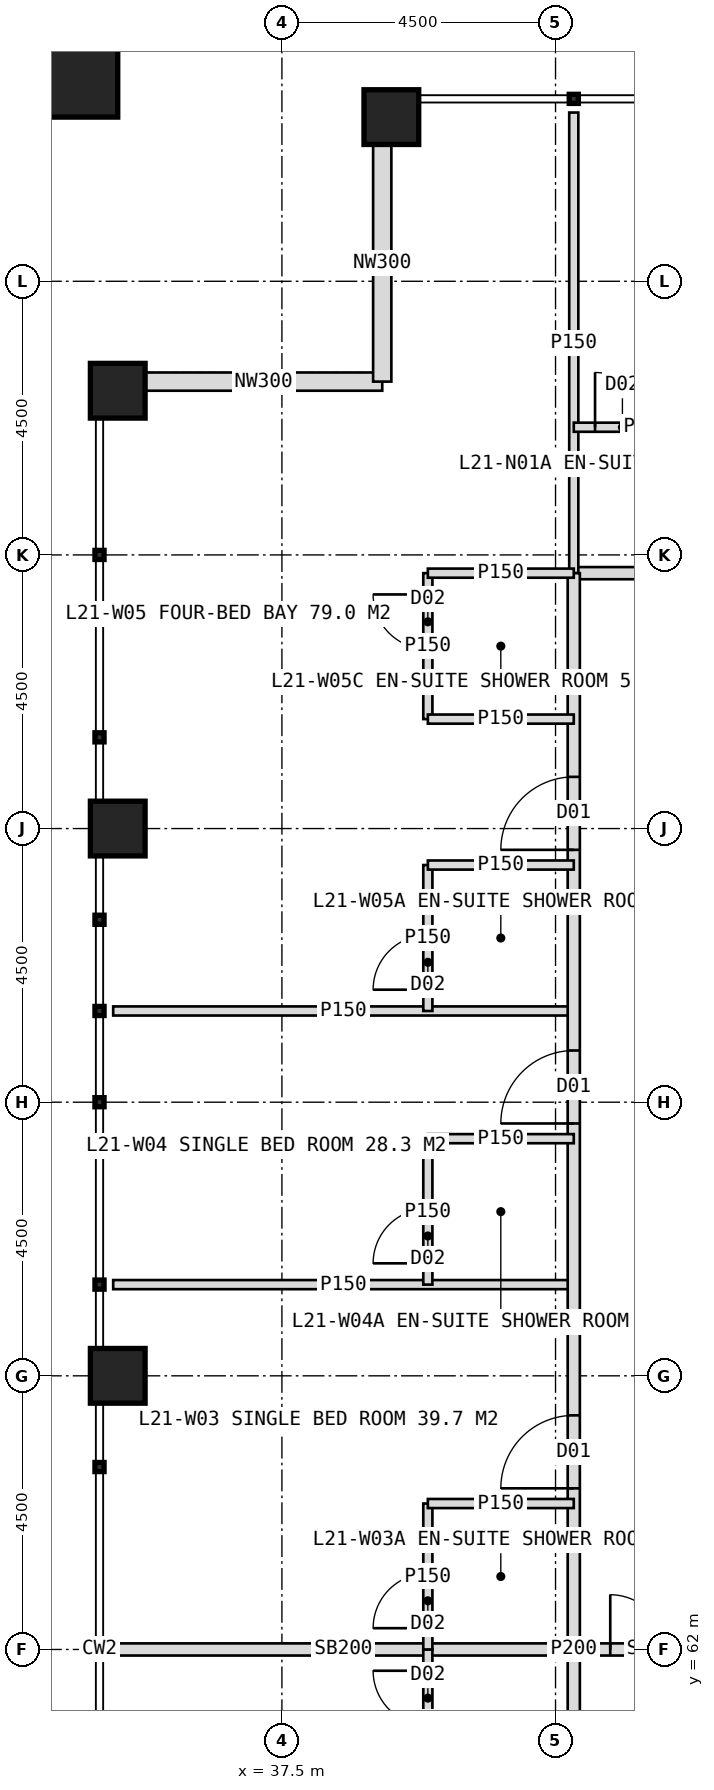
"""IFC4 building model, lengths in metres.
Left out: names, types, materials, properties, quantities, classifications, styles, units other than length and angle.
Written with IfcOpenShell. Run it as: python <this file> out.ifc"""

import sys

from ifc_helpers import new_model, si_unit, direction, frame, frame_2d, origin, origin_2d, place, context, subcontext, project, spatial, rectangle, hollow_rectangle, extrude, element, fill, save


model = new_model("IFC4")
c1 = context("Model", 3, precision=1e-05, world=origin(), true_north=direction((0.0, 1.0)))
c2 = subcontext(c1, "Body", "Model", "MODEL_VIEW")
j1 = project(units=[si_unit("LENGTHUNIT", "METRE"), si_unit("PLANEANGLEUNIT", "RADIAN")], contexts=[c1])
p1 = place(None, origin())
s1 = spatial("IfcSite", under=j1, at=p1, CompositionType="ELEMENT")
p2 = place(p1, origin())
s2 = spatial("IfcBuilding", under=s1, at=p2, CompositionType="ELEMENT")
p3 = place(p2, frame((0.0, 0.0, 91.0)))
s3 = spatial("IfcBuildingStorey", under=s2, at=p3, CompositionType="ELEMENT", Elevation=91.0)
for number, where, z_axis, x_axis in (
    (1, (39.3, 87.2, 0.0), (0.0, 0.0, 1.0), (1.0, 0.0, 0.0)),
    (2, (34.8, 66.5, 0.0), (0.0, 0.0, 1.0), (1.0, 0.0, 0.0)),
    (3, (34.8, 75.5, 0.0), (0.0, 0.0, 1.0), (1.0, 0.0, 0.0)),
    (4, (34.8, 82.7, 0.0), (0.0, 0.0, 1.0), (1.0, 0.0, 0.0)),
):
    element("IfcColumn", number, at=place(p3, frame(where, z_axis=z_axis, x_axis=x_axis)), inside=s3, PredefinedType="COLUMN", context=c2, shape_type="SweptSolid", body=[
        extrude(hollow_rectangle(XDim=0.9, YDim=0.9, WallThickness=0.08, at=origin_2d()), origin(), (0.0, 0.0, 1.0), 4.0),
    ])
p4 = place(p3, frame((33.9, 88.1, 0.0), z_axis=(0.0, 0.0, 1.0), x_axis=(1.0, 0.0, 0.0)))
e5 = element("IfcColumn", 5, at=p4, inside=s3, PredefinedType="COLUMN", context=c2, shape_type="SweptSolid", body=[
    extrude(hollow_rectangle(XDim=1.8, YDim=1.8, WallThickness=0.1, at=origin_2d()), origin(), (0.0, 0.0, 1.0), 2.0),
])
for number, where, z_axis, x_axis in (
    (6, (35.25, 82.85, 0.0), (0.0, 0.0, 1.0), (1.0, 0.0, 0.0)),
    (7, (39.15, 82.85, 0.0), (0.0, 0.0, 1.0), (0.0, 1.0, 0.0)),
):
    element("IfcWall", number, at=place(p3, frame(where, z_axis=z_axis, x_axis=x_axis)), inside=s3, PredefinedType="ELEMENTEDWALL", context=c2, shape_type="SweptSolid", body=[
        extrude(rectangle(XDim=3.9, YDim=0.3, at=frame_2d((1.95, 0.0))), origin(), (0.0, 0.0, 1.0), 2.95),
    ])
p5 = place(p3, frame((42.3, 79.7, 0.0), z_axis=(0.0, 0.0, 1.0), x_axis=(1.0, 0.0, 0.0)))
e8 = element("IfcWall", 8, at=p5, inside=s3, PredefinedType="PARTITIONING", context=c2, shape_type="SweptSolid", body=[
    extrude(rectangle(XDim=35.4, YDim=0.2, at=frame_2d((17.7, 0.0))), origin(), (0.0, 0.0, 1.0), 3.75),
])
p6 = place(p5, frame((2.65, 0.0, 0.0)))
e9 = element("IfcOpeningElement", 9, at=p6, cuts=e8, PredefinedType="OPENING", context=c2, shape_type="SweptSolid", body=[
    extrude(rectangle(XDim=1.2, YDim=2.2, at=frame_2d((0.6, 1.1))), frame((0.0, 0.11, 0.0), z_axis=(0.0, -1.0, 0.0), x_axis=(1.0, 0.0, 0.0)), (0.0, 0.0, 1.0), 0.22),
])
p7 = place(p5, frame((11.2, 0.0, 0.0)))
e10 = element("IfcOpeningElement", 10, at=p7, cuts=e8, PredefinedType="OPENING", context=c2, shape_type="SweptSolid", body=[
    extrude(rectangle(XDim=1.0, YDim=2.1, at=frame_2d((0.5, 1.05))), frame((0.0, 0.11, 0.0), z_axis=(0.0, -1.0, 0.0), x_axis=(1.0, 0.0, 0.0)), (0.0, 0.0, 1.0), 0.22),
])
p8 = place(p5, frame((17.2, 0.0, 0.0)))
e11 = element("IfcOpeningElement", 11, at=p8, cuts=e8, PredefinedType="OPENING", context=c2, shape_type="SweptSolid", body=[
    extrude(rectangle(XDim=1.0, YDim=2.1, at=frame_2d((0.5, 1.05))), frame((0.0, 0.11, 0.0), z_axis=(0.0, -1.0, 0.0), x_axis=(1.0, 0.0, 0.0)), (0.0, 0.0, 1.0), 0.22),
])
p9 = place(p5, frame((23.35, 0.0, 0.0)))
e12 = element("IfcOpeningElement", 12, at=p9, cuts=e8, PredefinedType="OPENING", context=c2, shape_type="SweptSolid", body=[
    extrude(rectangle(XDim=1.2, YDim=2.2, at=frame_2d((0.6, 1.1))), frame((0.0, 0.11, 0.0), z_axis=(0.0, -1.0, 0.0), x_axis=(1.0, 0.0, 0.0)), (0.0, 0.0, 1.0), 0.22),
])
p10 = place(p5, frame((29.35, 0.0, 0.0)))
e13 = element("IfcOpeningElement", 13, at=p10, cuts=e8, PredefinedType="OPENING", context=c2, shape_type="SweptSolid", body=[
    extrude(rectangle(XDim=1.2, YDim=2.2, at=frame_2d((0.6, 1.1))), frame((0.0, 0.11, 0.0), z_axis=(0.0, -1.0, 0.0), x_axis=(1.0, 0.0, 0.0)), (0.0, 0.0, 1.0), 0.22),
])
p11 = place(p3, frame((42.3, 79.7, 0.0), z_axis=(0.0, 0.0, 1.0), x_axis=(0.0, 1.0, 0.0)))
e14 = element("IfcWall", 14, at=p11, inside=s3, PredefinedType="PARTITIONING", context=c2, shape_type="SweptSolid", body=[
    extrude(rectangle(XDim=7.575, YDim=0.15, at=frame_2d((3.788, 0.0))), origin(), (0.0, 0.0, 1.0), 3.75),
])
p12 = place(p3, frame((42.3, 82.1, 0.0), z_axis=(0.0, 0.0, 1.0), x_axis=(1.0, 0.0, 0.0)))
e15 = element("IfcWall", 15, at=p12, inside=s3, PredefinedType="PARTITIONING", context=c2, shape_type="SweptSolid", body=[
    extrude(rectangle(XDim=2.4, YDim=0.15, at=frame_2d((1.2, 0.0))), origin(), (0.0, 0.0, 1.0), 3.75),
])
p13 = place(p12, frame((0.35, 0.0, 0.0)))
e16 = element("IfcOpeningElement", 16, at=p13, cuts=e15, PredefinedType="OPENING", context=c2, shape_type="SweptSolid", body=[
    extrude(rectangle(XDim=0.9, YDim=2.1, at=frame_2d((0.45, 1.05))), frame((0.0, 0.085, 0.0), z_axis=(0.0, -1.0, 0.0), x_axis=(1.0, 0.0, 0.0)), (0.0, 0.0, 1.0), 0.17),
])
p14 = place(p3, frame((42.3, 62.0, 0.0), z_axis=(0.0, 0.0, 1.0), x_axis=(-1.0, 0.0, 0.0)))
e17 = element("IfcWall", 17, at=p14, inside=s3, PredefinedType="SOLIDWALL", context=c2, shape_type="SweptSolid", body=[
    extrude(rectangle(XDim=7.575, YDim=0.2, at=frame_2d((3.788, 0.0))), origin(), (0.0, 0.0, 1.0), 2.75),
])
for number, where, z_axis, x_axis in (
    (18, (42.3, 68.0, 0.0), (0.0, 0.0, 1.0), (-1.0, 0.0, 0.0)),
    (19, (42.3, 72.5, 0.0), (0.0, 0.0, 1.0), (-1.0, 0.0, 0.0)),
):
    element("IfcWall", number, at=place(p3, frame(where, z_axis=z_axis, x_axis=x_axis)), inside=s3, PredefinedType="PARTITIONING", context=c2, shape_type="SweptSolid", body=[
        extrude(rectangle(XDim=7.575, YDim=0.15, at=frame_2d((3.788, 0.0))), origin(), (0.0, 0.0, 1.0), 3.75),
    ])
p15 = place(p3, frame((42.3, 44.3, 0.0), z_axis=(0.0, 0.0, 1.0), x_axis=(0.0, 1.0, 0.0)))
e20 = element("IfcWall", 20, at=p15, inside=s3, PredefinedType="PARTITIONING", context=c2, shape_type="SweptSolid", body=[
    extrude(rectangle(XDim=35.4, YDim=0.2, at=frame_2d((17.7, 0.0))), origin(), (0.0, 0.0, 1.0), 3.75),
])
p16 = place(p15, frame((2.65, 0.0, 0.0)))
e21 = element("IfcOpeningElement", 21, at=p16, cuts=e20, PredefinedType="OPENING", context=c2, shape_type="SweptSolid", body=[
    extrude(rectangle(XDim=1.2, YDim=2.2, at=frame_2d((0.6, 1.1))), frame((0.0, 0.11, 0.0), z_axis=(0.0, -1.0, 0.0), x_axis=(1.0, 0.0, 0.0)), (0.0, 0.0, 1.0), 0.22),
])
p17 = place(p15, frame((11.35, 0.0, 0.0)))
e22 = element("IfcOpeningElement", 22, at=p17, cuts=e20, PredefinedType="OPENING", context=c2, shape_type="SweptSolid", body=[
    extrude(rectangle(XDim=1.2, YDim=2.2, at=frame_2d((0.6, 1.1))), frame((0.0, 0.11, 0.0), z_axis=(0.0, -1.0, 0.0), x_axis=(1.0, 0.0, 0.0)), (0.0, 0.0, 1.0), 0.22),
])
p18 = place(p15, frame((20.35, 0.0, 0.0)))
e23 = element("IfcOpeningElement", 23, at=p18, cuts=e20, PredefinedType="OPENING", context=c2, shape_type="SweptSolid", body=[
    extrude(rectangle(XDim=1.2, YDim=2.2, at=frame_2d((0.6, 1.1))), frame((0.0, 0.11, 0.0), z_axis=(0.0, -1.0, 0.0), x_axis=(1.0, 0.0, 0.0)), (0.0, 0.0, 1.0), 0.22),
])
p19 = place(p15, frame((26.35, 0.0, 0.0)))
e24 = element("IfcOpeningElement", 24, at=p19, cuts=e20, PredefinedType="OPENING", context=c2, shape_type="SweptSolid", body=[
    extrude(rectangle(XDim=1.2, YDim=2.2, at=frame_2d((0.6, 1.1))), frame((0.0, 0.11, 0.0), z_axis=(0.0, -1.0, 0.0), x_axis=(1.0, 0.0, 0.0)), (0.0, 0.0, 1.0), 0.22),
])
p20 = place(p15, frame((30.85, 0.0, 0.0)))
e25 = element("IfcOpeningElement", 25, at=p20, cuts=e20, PredefinedType="OPENING", context=c2, shape_type="SweptSolid", body=[
    extrude(rectangle(XDim=1.2, YDim=2.2, at=frame_2d((0.6, 1.1))), frame((0.0, 0.11, 0.0), z_axis=(0.0, -1.0, 0.0), x_axis=(1.0, 0.0, 0.0)), (0.0, 0.0, 1.0), 0.22),
])
p21 = place(p3, frame((39.9, 59.6, 0.0), z_axis=(0.0, 0.0, 1.0), x_axis=(0.0, 1.0, 0.0)))
e26 = element("IfcWall", 26, at=p21, inside=s3, PredefinedType="PARTITIONING", context=c2, shape_type="SweptSolid", body=[
    extrude(rectangle(XDim=2.4, YDim=0.15, at=frame_2d((1.2, 0.0))), origin(), (0.0, 0.0, 1.0), 3.75),
])
p22 = place(p21, frame((1.15, 0.0, 0.0)))
e27 = element("IfcOpeningElement", 27, at=p22, cuts=e26, PredefinedType="OPENING", context=c2, shape_type="SweptSolid", body=[
    extrude(rectangle(XDim=0.9, YDim=2.1, at=frame_2d((0.45, 1.05))), frame((0.0, 0.085, 0.0), z_axis=(0.0, -1.0, 0.0), x_axis=(1.0, 0.0, 0.0)), (0.0, 0.0, 1.0), 0.17),
])
p23 = place(p3, frame((39.9, 62.0, 0.0), z_axis=(0.0, 0.0, 1.0), x_axis=(0.0, 1.0, 0.0)))
e28 = element("IfcWall", 28, at=p23, inside=s3, PredefinedType="PARTITIONING", context=c2, shape_type="SweptSolid", body=[
    extrude(rectangle(XDim=2.4, YDim=0.15, at=frame_2d((1.2, 0.0))), origin(), (0.0, 0.0, 1.0), 3.75),
])
p24 = place(p23, frame((0.35, 0.0, 0.0)))
e29 = element("IfcOpeningElement", 29, at=p24, cuts=e28, PredefinedType="OPENING", context=c2, shape_type="SweptSolid", body=[
    extrude(rectangle(XDim=0.9, YDim=2.1, at=frame_2d((0.45, 1.05))), frame((0.0, 0.085, 0.0), z_axis=(0.0, -1.0, 0.0), x_axis=(1.0, 0.0, 0.0)), (0.0, 0.0, 1.0), 0.17),
])
p25 = place(p3, frame((42.3, 64.4, 0.0), z_axis=(0.0, 0.0, 1.0), x_axis=(-1.0, 0.0, 0.0)))
e30 = element("IfcWall", 30, at=p25, inside=s3, PredefinedType="PARTITIONING", context=c2, shape_type="SweptSolid", body=[
    extrude(rectangle(XDim=2.4, YDim=0.15, at=frame_2d((1.2, 0.0))), origin(), (0.0, 0.0, 1.0), 3.75),
])
p26 = place(p3, frame((39.9, 68.0, 0.0), z_axis=(0.0, 0.0, 1.0), x_axis=(0.0, 1.0, 0.0)))
e31 = element("IfcWall", 31, at=p26, inside=s3, PredefinedType="PARTITIONING", context=c2, shape_type="SweptSolid", body=[
    extrude(rectangle(XDim=2.4, YDim=0.15, at=frame_2d((1.2, 0.0))), origin(), (0.0, 0.0, 1.0), 3.75),
])
p27 = place(p26, frame((0.35, 0.0, 0.0)))
e32 = element("IfcOpeningElement", 32, at=p27, cuts=e31, PredefinedType="OPENING", context=c2, shape_type="SweptSolid", body=[
    extrude(rectangle(XDim=0.9, YDim=2.1, at=frame_2d((0.45, 1.05))), frame((0.0, 0.085, 0.0), z_axis=(0.0, -1.0, 0.0), x_axis=(1.0, 0.0, 0.0)), (0.0, 0.0, 1.0), 0.17),
])
p28 = place(p3, frame((42.3, 70.4, 0.0), z_axis=(0.0, 0.0, 1.0), x_axis=(-1.0, 0.0, 0.0)))
e33 = element("IfcWall", 33, at=p28, inside=s3, PredefinedType="PARTITIONING", context=c2, shape_type="SweptSolid", body=[
    extrude(rectangle(XDim=2.4, YDim=0.15, at=frame_2d((1.2, 0.0))), origin(), (0.0, 0.0, 1.0), 3.75),
])
p29 = place(p3, frame((39.9, 72.5, 0.0), z_axis=(0.0, 0.0, 1.0), x_axis=(0.0, 1.0, 0.0)))
e34 = element("IfcWall", 34, at=p29, inside=s3, PredefinedType="PARTITIONING", context=c2, shape_type="SweptSolid", body=[
    extrude(rectangle(XDim=2.4, YDim=0.15, at=frame_2d((1.2, 0.0))), origin(), (0.0, 0.0, 1.0), 3.75),
])
p30 = place(p29, frame((0.35, 0.0, 0.0)))
e35 = element("IfcOpeningElement", 35, at=p30, cuts=e34, PredefinedType="OPENING", context=c2, shape_type="SweptSolid", body=[
    extrude(rectangle(XDim=0.9, YDim=2.1, at=frame_2d((0.45, 1.05))), frame((0.0, 0.085, 0.0), z_axis=(0.0, -1.0, 0.0), x_axis=(1.0, 0.0, 0.0)), (0.0, 0.0, 1.0), 0.17),
])
p31 = place(p3, frame((42.3, 74.9, 0.0), z_axis=(0.0, 0.0, 1.0), x_axis=(-1.0, 0.0, 0.0)))
e36 = element("IfcWall", 36, at=p31, inside=s3, PredefinedType="PARTITIONING", context=c2, shape_type="SweptSolid", body=[
    extrude(rectangle(XDim=2.4, YDim=0.15, at=frame_2d((1.2, 0.0))), origin(), (0.0, 0.0, 1.0), 3.75),
])
p32 = place(p3, frame((39.9, 77.3, 0.0), z_axis=(0.0, 0.0, 1.0), x_axis=(0.0, 1.0, 0.0)))
e37 = element("IfcWall", 37, at=p32, inside=s3, PredefinedType="PARTITIONING", context=c2, shape_type="SweptSolid", body=[
    extrude(rectangle(XDim=2.4, YDim=0.15, at=frame_2d((1.2, 0.0))), origin(), (0.0, 0.0, 1.0), 3.75),
])
p33 = place(p32, frame((1.15, 0.0, 0.0)))
e38 = element("IfcOpeningElement", 38, at=p33, cuts=e37, PredefinedType="OPENING", context=c2, shape_type="SweptSolid", body=[
    extrude(rectangle(XDim=0.9, YDim=2.1, at=frame_2d((0.45, 1.05))), frame((0.0, 0.085, 0.0), z_axis=(0.0, -1.0, 0.0), x_axis=(1.0, 0.0, 0.0)), (0.0, 0.0, 1.0), 0.17),
])
for number, where, z_axis, x_axis in (
    (39, (42.3, 77.3, 0.0), (0.0, 0.0, 1.0), (-1.0, 0.0, 0.0)),
    (40, (42.3, 79.7, 0.0), (0.0, 0.0, 1.0), (-1.0, 0.0, 0.0)),
):
    element("IfcWall", number, at=place(p3, frame(where, z_axis=z_axis, x_axis=x_axis)), inside=s3, PredefinedType="PARTITIONING", context=c2, shape_type="SweptSolid", body=[
        extrude(rectangle(XDim=2.4, YDim=0.15, at=frame_2d((1.2, 0.0))), origin(), (0.0, 0.0, 1.0), 3.75),
    ])
p34 = place(p3, frame((45.0, 62.0, 0.0), z_axis=(0.0, 0.0, 1.0), x_axis=(-1.0, 0.0, 0.0)))
e41 = element("IfcWall", 41, at=p34, inside=s3, PredefinedType="SOLIDWALL", context=c2, shape_type="SweptSolid", body=[
    extrude(rectangle(XDim=2.7, YDim=0.2, at=frame_2d((1.35, 0.0))), origin(), (0.0, 0.0, 1.0), 2.75),
])
p35 = place(p34, frame((0.3, 0.0, 0.0)))
e42 = element("IfcOpeningElement", 42, at=p35, cuts=e41, PredefinedType="OPENING", context=c2, shape_type="SweptSolid", body=[
    extrude(rectangle(XDim=1.8, YDim=2.2, at=frame_2d((0.9, 1.1))), frame((0.0, 0.11, 0.0), z_axis=(0.0, -1.0, 0.0), x_axis=(1.0, 0.0, 0.0)), (0.0, 0.0, 1.0), 0.22),
])
p36 = place(p13, origin())
e43 = element("IfcDoor", 43, at=p36, inside=s3, OperationType="SINGLE_SWING_LEFT", PredefinedType="DOOR", context=c2, shape_type="SweptSolid", body=[
    extrude(rectangle(XDim=0.9, YDim=2.1, at=frame_2d((0.45, 1.05))), frame((0.0, 0.025, 0.0), z_axis=(0.0, -1.0, 0.0), x_axis=(1.0, 0.0, 0.0)), (0.0, 0.0, 1.0), 0.05),
])
fill(e16, e43)
p37 = place(p22, origin())
e44 = element("IfcDoor", 44, at=p37, inside=s3, OperationType="SINGLE_SWING_RIGHT", PredefinedType="DOOR", context=c2, shape_type="SweptSolid", body=[
    extrude(rectangle(XDim=0.9, YDim=2.1, at=frame_2d((0.45, 1.05))), frame((0.0, 0.025, 0.0), z_axis=(0.0, -1.0, 0.0), x_axis=(1.0, 0.0, 0.0)), (0.0, 0.0, 1.0), 0.05),
])
fill(e27, e44)
p38 = place(p18, origin())
e45 = element("IfcDoor", 45, at=p38, inside=s3, OperationType="SINGLE_SWING_LEFT", PredefinedType="DOOR", context=c2, shape_type="SweptSolid", body=[
    extrude(rectangle(XDim=1.2, YDim=2.2, at=frame_2d((0.6, 1.1))), frame((0.0, 0.025, 0.0), z_axis=(0.0, -1.0, 0.0), x_axis=(1.0, 0.0, 0.0)), (0.0, 0.0, 1.0), 0.05),
])
fill(e23, e45)
p39 = place(p24, origin())
e46 = element("IfcDoor", 46, at=p39, inside=s3, OperationType="SINGLE_SWING_LEFT", PredefinedType="DOOR", context=c2, shape_type="SweptSolid", body=[
    extrude(rectangle(XDim=0.9, YDim=2.1, at=frame_2d((0.45, 1.05))), frame((0.0, 0.025, 0.0), z_axis=(0.0, -1.0, 0.0), x_axis=(1.0, 0.0, 0.0)), (0.0, 0.0, 1.0), 0.05),
])
fill(e29, e46)
p40 = place(p19, origin())
e47 = element("IfcDoor", 47, at=p40, inside=s3, OperationType="SINGLE_SWING_LEFT", PredefinedType="DOOR", context=c2, shape_type="SweptSolid", body=[
    extrude(rectangle(XDim=1.2, YDim=2.2, at=frame_2d((0.6, 1.1))), frame((0.0, 0.025, 0.0), z_axis=(0.0, -1.0, 0.0), x_axis=(1.0, 0.0, 0.0)), (0.0, 0.0, 1.0), 0.05),
])
fill(e24, e47)
p41 = place(p27, origin())
e48 = element("IfcDoor", 48, at=p41, inside=s3, OperationType="SINGLE_SWING_LEFT", PredefinedType="DOOR", context=c2, shape_type="SweptSolid", body=[
    extrude(rectangle(XDim=0.9, YDim=2.1, at=frame_2d((0.45, 1.05))), frame((0.0, 0.025, 0.0), z_axis=(0.0, -1.0, 0.0), x_axis=(1.0, 0.0, 0.0)), (0.0, 0.0, 1.0), 0.05),
])
fill(e32, e48)
p42 = place(p20, origin())
e49 = element("IfcDoor", 49, at=p42, inside=s3, OperationType="SINGLE_SWING_LEFT", PredefinedType="DOOR", context=c2, shape_type="SweptSolid", body=[
    extrude(rectangle(XDim=1.2, YDim=2.2, at=frame_2d((0.6, 1.1))), frame((0.0, 0.025, 0.0), z_axis=(0.0, -1.0, 0.0), x_axis=(1.0, 0.0, 0.0)), (0.0, 0.0, 1.0), 0.05),
])
fill(e25, e49)
p43 = place(p30, origin())
e50 = element("IfcDoor", 50, at=p43, inside=s3, OperationType="SINGLE_SWING_LEFT", PredefinedType="DOOR", context=c2, shape_type="SweptSolid", body=[
    extrude(rectangle(XDim=0.9, YDim=2.1, at=frame_2d((0.45, 1.05))), frame((0.0, 0.025, 0.0), z_axis=(0.0, -1.0, 0.0), x_axis=(1.0, 0.0, 0.0)), (0.0, 0.0, 1.0), 0.05),
])
fill(e35, e50)
p44 = place(p33, origin())
e51 = element("IfcDoor", 51, at=p44, inside=s3, OperationType="SINGLE_SWING_RIGHT", PredefinedType="DOOR", context=c2, shape_type="SweptSolid", body=[
    extrude(rectangle(XDim=0.9, YDim=2.1, at=frame_2d((0.45, 1.05))), frame((0.0, 0.025, 0.0), z_axis=(0.0, -1.0, 0.0), x_axis=(1.0, 0.0, 0.0)), (0.0, 0.0, 1.0), 0.05),
])
fill(e38, e51)
p45 = place(p35, origin())
e52 = element("IfcDoor", 52, at=p45, inside=s3, OperationType="DOUBLE_DOOR_DOUBLE_SWING", PredefinedType="DOOR", context=c2, shape_type="SweptSolid", body=[
    extrude(rectangle(XDim=1.8, YDim=2.2, at=frame_2d((0.9, 1.1))), frame((0.0, 0.025, 0.0), z_axis=(0.0, -1.0, 0.0), x_axis=(1.0, 0.0, 0.0)), (0.0, 0.0, 1.0), 0.05),
])
fill(e42, e52)
save(model, sys.argv[1])
